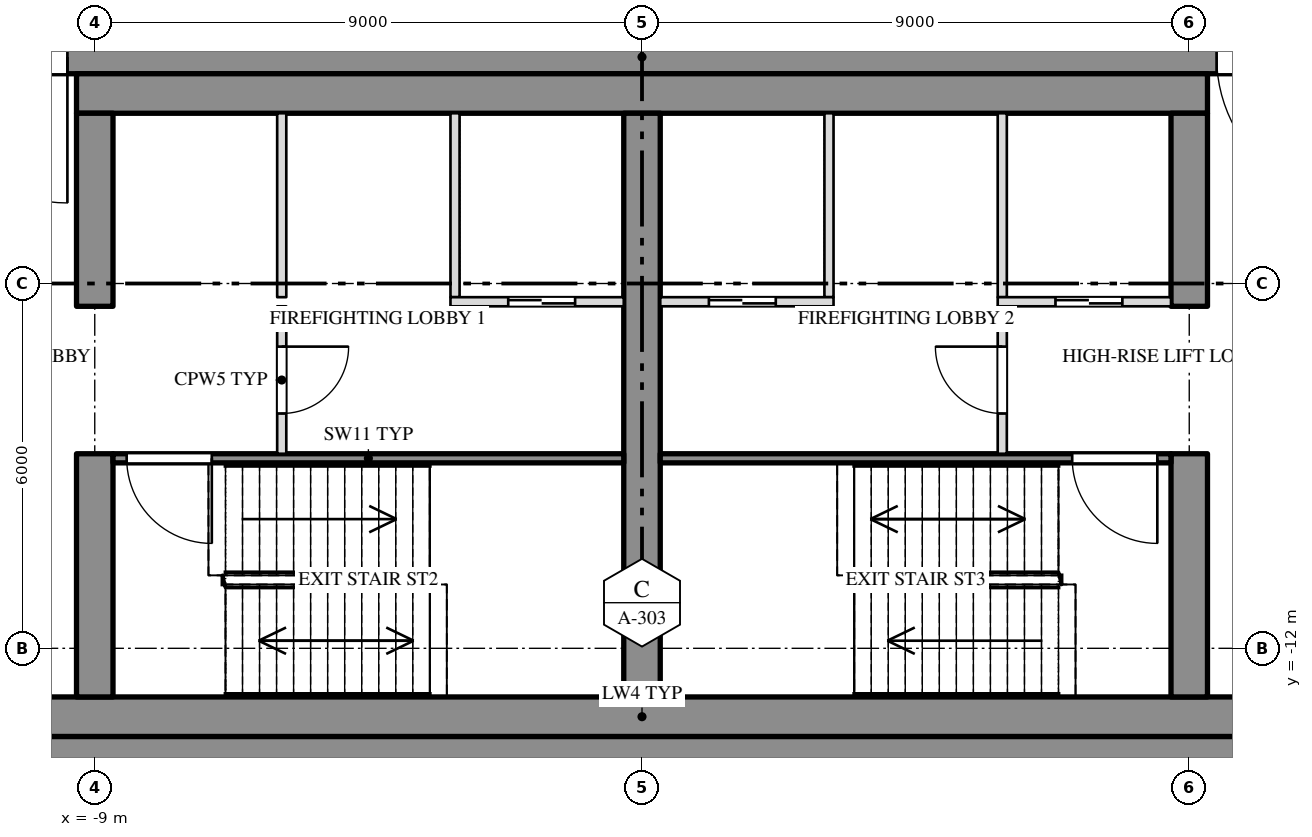
"""IFC4 building model, lengths in metres.
Left out: names, types, materials, properties, quantities, classifications, styles, units other than length and angle.
Written with IfcOpenShell. Run it as: python <this file> out.ifc"""

import sys

from ifc_helpers import new_model, si_unit, direction, frame, frame_2d, origin, place, context, subcontext, project, spatial, rectangle, extrude, element, fill, save


model = new_model("IFC4")
c1 = context("Model", 3, precision=1e-05, world=origin(), true_north=direction((0.0, 1.0)))
c2 = subcontext(c1, "Body", "Model", "MODEL_VIEW")
j1 = project(units=[si_unit("LENGTHUNIT", "METRE"), si_unit("PLANEANGLEUNIT", "RADIAN")], contexts=[c1])
p1 = place(None, origin())
s1 = spatial("IfcSite", under=j1, at=p1, CompositionType="ELEMENT")
p2 = place(p1, origin())
s2 = spatial("IfcBuilding", under=s1, at=p2, CompositionType="ELEMENT")
p3 = place(p2, frame((0.0, 0.0, 280.5)))
s3 = spatial("IfcBuildingStorey", under=s2, at=p3, CompositionType="ELEMENT", Elevation=280.5)
p4 = place(p3, frame((-27.0, -2.275, 0.0), z_axis=(0.0, 0.0, 1.0), x_axis=(1.0, 0.0, 0.0)))
e1 = element("IfcWall", 1, at=p4, inside=s3, PredefinedType="SHEAR", context=c2, shape_type="SweptSolid", body=[
    extrude(rectangle(XDim=54.0, YDim=0.55, at=frame_2d((27.0, 0.0))), origin(), (0.0, 0.0, 1.0), 3.78),
])
p5 = place(p4, frame((15.15, 0.0, 0.0)))
e2 = element("IfcOpeningElement", 2, at=p5, cuts=e1, PredefinedType="OPENING", context=c2, shape_type="SweptSolid", body=[
    extrude(rectangle(XDim=2.4, YDim=2.1, at=frame_2d((1.2, 1.05))), frame((0.0, 0.287, 0.0), z_axis=(0.0, -1.0, 0.0), x_axis=(1.0, 0.0, 0.0)), (0.0, 0.0, 1.0), 0.574),
])
p6 = place(p4, frame((36.45, 0.0, 0.0)))
e3 = element("IfcOpeningElement", 3, at=p6, cuts=e1, PredefinedType="OPENING", context=c2, shape_type="SweptSolid", body=[
    extrude(rectangle(XDim=2.4, YDim=2.1, at=frame_2d((1.2, 1.05))), frame((0.0, 0.287, 0.0), z_axis=(0.0, -1.0, 0.0), x_axis=(1.0, 0.0, 0.0)), (0.0, 0.0, 1.0), 0.574),
])
p7 = place(p3, frame((-27.0, -13.725, 0.0), z_axis=(0.0, 0.0, 1.0), x_axis=(1.0, 0.0, 0.0)))
e4 = element("IfcWall", 4, at=p7, inside=s3, PredefinedType="SHEAR", context=c2, shape_type="SweptSolid", body=[
    extrude(rectangle(XDim=54.0, YDim=0.55, at=frame_2d((27.0, 0.0))), origin(), (0.0, 0.0, 1.0), 3.78),
])
p8 = place(p3, frame((-9.3, -2.875, 0.0), z_axis=(0.0, 0.0, 1.0), x_axis=(1.0, 0.0, 0.0)))
e5 = element("IfcWall", 5, at=p8, inside=s3, PredefinedType="SHEAR", context=c2, shape_type="SweptSolid", body=[
    extrude(rectangle(XDim=18.6, YDim=0.65, at=frame_2d((9.3, 0.0))), origin(), (0.0, 0.0, 1.0), 3.78),
])
p9 = place(p3, frame((-26.45, -13.125, 0.0), z_axis=(0.0, 0.0, 1.0), x_axis=(1.0, 0.0, 0.0)))
e6 = element("IfcWall", 6, at=p9, inside=s3, PredefinedType="SHEAR", context=c2, shape_type="SweptSolid", body=[
    extrude(rectangle(XDim=52.9, YDim=0.65, at=frame_2d((26.45, 0.0))), origin(), (0.0, 0.0, 1.0), 3.78),
])
p10 = place(p3, frame((-9.0, -12.8, 0.0), z_axis=(0.0, 0.0, 1.0), x_axis=(0.0, 1.0, 0.0)))
e7 = element("IfcWall", 7, at=p10, inside=s3, PredefinedType="SHEAR", context=c2, shape_type="SweptSolid", body=[
    extrude(rectangle(XDim=4.0, YDim=0.6, at=frame_2d((2.0, 0.0))), origin(), (0.0, 0.0, 1.0), 3.78),
])
p11 = place(p3, frame((-9.0, -6.375, 0.0), z_axis=(0.0, 0.0, 1.0), x_axis=(0.0, 1.0, 0.0)))
e8 = element("IfcWall", 8, at=p11, inside=s3, PredefinedType="SHEAR", context=c2, shape_type="SweptSolid", body=[
    extrude(rectangle(XDim=3.175, YDim=0.6, at=frame_2d((1.587, 0.0))), origin(), (0.0, 0.0, 1.0), 3.78),
])
p12 = place(p3, frame((0.0, -12.8, 0.0), z_axis=(0.0, 0.0, 1.0), x_axis=(0.0, 1.0, 0.0)))
e9 = element("IfcWall", 9, at=p12, inside=s3, PredefinedType="SHEAR", context=c2, shape_type="SweptSolid", body=[
    extrude(rectangle(XDim=9.6, YDim=0.6, at=frame_2d((4.8, 0.0))), origin(), (0.0, 0.0, 1.0), 3.78),
])
p13 = place(p3, frame((9.0, -12.8, 0.0), z_axis=(0.0, 0.0, 1.0), x_axis=(0.0, 1.0, 0.0)))
e10 = element("IfcWall", 10, at=p13, inside=s3, PredefinedType="SHEAR", context=c2, shape_type="SweptSolid", body=[
    extrude(rectangle(XDim=4.0, YDim=0.6, at=frame_2d((2.0, 0.0))), origin(), (0.0, 0.0, 1.0), 3.78),
])
p14 = place(p3, frame((9.0, -6.375, 0.0), z_axis=(0.0, 0.0, 1.0), x_axis=(0.0, 1.0, 0.0)))
e11 = element("IfcWall", 11, at=p14, inside=s3, PredefinedType="SHEAR", context=c2, shape_type="SweptSolid", body=[
    extrude(rectangle(XDim=3.175, YDim=0.6, at=frame_2d((1.587, 0.0))), origin(), (0.0, 0.0, 1.0), 3.78),
])
for number, where, z_axis, x_axis in (
    (12, (-3.075, -6.225, 0.0), (0.0, 0.0, 1.0), (0.0, 1.0, 0.0)),
    (13, (-5.925, -6.225, 0.0), (0.0, 0.0, 1.0), (0.0, 1.0, 0.0)),
    (14, (3.075, -6.225, 0.0), (0.0, 0.0, 1.0), (0.0, 1.0, 0.0)),
    (15, (5.925, -6.225, 0.0), (0.0, 0.0, 1.0), (0.0, 1.0, 0.0)),
):
    element("IfcWall", number, at=place(p3, frame(where, z_axis=z_axis, x_axis=x_axis)), inside=s3, PredefinedType="PARTITIONING", context=c2, shape_type="SweptSolid", body=[
        extrude(rectangle(XDim=3.025, YDim=0.15, at=frame_2d((1.513, 0.0))), origin(), (0.0, 0.0, 1.0), 3.78),
    ])
p15 = place(p3, frame((-5.925, -8.8, 0.0), z_axis=(0.0, 0.0, 1.0), x_axis=(0.0, 1.0, 0.0)))
e16 = element("IfcWall", 16, at=p15, inside=s3, PredefinedType="PARTITIONING", context=c2, shape_type="SweptSolid", body=[
    extrude(rectangle(XDim=2.425, YDim=0.15, at=frame_2d((1.212, 0.0))), origin(), (0.0, 0.0, 1.0), 3.78),
])
p16 = place(p15, frame((0.662, 0.0, 0.0)))
e17 = element("IfcOpeningElement", 17, at=p16, cuts=e16, PredefinedType="OPENING", context=c2, shape_type="SweptSolid", body=[
    extrude(rectangle(XDim=1.1, YDim=2.1, at=frame_2d((0.55, 1.05))), frame((0.0, 0.087, 0.0), z_axis=(0.0, -1.0, 0.0), x_axis=(1.0, 0.0, 0.0)), (0.0, 0.0, 1.0), 0.174),
])
p17 = place(p3, frame((5.925, -8.8, 0.0), z_axis=(0.0, 0.0, 1.0), x_axis=(0.0, 1.0, 0.0)))
e18 = element("IfcWall", 18, at=p17, inside=s3, PredefinedType="PARTITIONING", context=c2, shape_type="SweptSolid", body=[
    extrude(rectangle(XDim=2.425, YDim=0.15, at=frame_2d((1.212, 0.0))), origin(), (0.0, 0.0, 1.0), 3.78),
])
p18 = place(p17, frame((0.662, 0.0, 0.0)))
e19 = element("IfcOpeningElement", 19, at=p18, cuts=e18, PredefinedType="OPENING", context=c2, shape_type="SweptSolid", body=[
    extrude(rectangle(XDim=1.1, YDim=2.1, at=frame_2d((0.55, 1.05))), frame((0.0, 0.087, 0.0), z_axis=(0.0, -1.0, 0.0), x_axis=(1.0, 0.0, 0.0)), (0.0, 0.0, 1.0), 0.174),
])
p19 = place(p3, frame((-3.15, -6.3, 0.0), z_axis=(0.0, 0.0, 1.0), x_axis=(1.0, 0.0, 0.0)))
e20 = element("IfcWall", 20, at=p19, inside=s3, PredefinedType="PARTITIONING", context=c2, shape_type="SweptSolid", body=[
    extrude(rectangle(XDim=2.85, YDim=0.15, at=frame_2d((1.425, 0.0))), origin(), (0.0, 0.0, 1.0), 3.78),
])
p20 = place(p19, frame((0.95, 0.0, 0.0)))
e21 = element("IfcOpeningElement", 21, at=p20, cuts=e20, PredefinedType="OPENING", context=c2, shape_type="SweptSolid", body=[
    extrude(rectangle(XDim=1.1, YDim=2.1, at=frame_2d((0.55, 1.05))), frame((0.0, 0.087, 0.0), z_axis=(0.0, -1.0, 0.0), x_axis=(1.0, 0.0, 0.0)), (0.0, 0.0, 1.0), 0.174),
])
p21 = place(p3, frame((0.3, -6.3, 0.0), z_axis=(0.0, 0.0, 1.0), x_axis=(1.0, 0.0, 0.0)))
e22 = element("IfcWall", 22, at=p21, inside=s3, PredefinedType="PARTITIONING", context=c2, shape_type="SweptSolid", body=[
    extrude(rectangle(XDim=2.85, YDim=0.15, at=frame_2d((1.425, 0.0))), origin(), (0.0, 0.0, 1.0), 3.78),
])
p22 = place(p21, frame((0.8, 0.0, 0.0)))
e23 = element("IfcOpeningElement", 23, at=p22, cuts=e22, PredefinedType="OPENING", context=c2, shape_type="SweptSolid", body=[
    extrude(rectangle(XDim=1.1, YDim=2.1, at=frame_2d((0.55, 1.05))), frame((0.0, 0.087, 0.0), z_axis=(0.0, -1.0, 0.0), x_axis=(1.0, 0.0, 0.0)), (0.0, 0.0, 1.0), 0.174),
])
p23 = place(p3, frame((5.85, -6.3, 0.0), z_axis=(0.0, 0.0, 1.0), x_axis=(1.0, 0.0, 0.0)))
e24 = element("IfcWall", 24, at=p23, inside=s3, PredefinedType="PARTITIONING", context=c2, shape_type="SweptSolid", body=[
    extrude(rectangle(XDim=2.85, YDim=0.15, at=frame_2d((1.425, 0.0))), origin(), (0.0, 0.0, 1.0), 3.78),
])
p24 = place(p23, frame((0.95, 0.0, 0.0)))
e25 = element("IfcOpeningElement", 25, at=p24, cuts=e24, PredefinedType="OPENING", context=c2, shape_type="SweptSolid", body=[
    extrude(rectangle(XDim=1.1, YDim=2.1, at=frame_2d((0.55, 1.05))), frame((0.0, 0.087, 0.0), z_axis=(0.0, -1.0, 0.0), x_axis=(1.0, 0.0, 0.0)), (0.0, 0.0, 1.0), 0.174),
])
p25 = place(p3, frame((-8.7, -8.875, 0.0), z_axis=(0.0, 0.0, 1.0), x_axis=(1.0, 0.0, 0.0)))
e26 = element("IfcWall", 26, at=p25, inside=s3, PredefinedType="SHEAR", context=c2, shape_type="SweptSolid", body=[
    extrude(rectangle(XDim=8.4, YDim=0.15, at=frame_2d((4.2, 0.0))), origin(), (0.0, 0.0, 1.0), 3.78),
])
p26 = place(p25, frame((0.225, 0.0, 0.0)))
e27 = element("IfcOpeningElement", 27, at=p26, cuts=e26, PredefinedType="OPENING", context=c2, shape_type="SweptSolid", body=[
    extrude(rectangle(XDim=1.4, YDim=2.1, at=frame_2d((0.7, 1.05))), frame((0.0, 0.087, 0.0), z_axis=(0.0, -1.0, 0.0), x_axis=(1.0, 0.0, 0.0)), (0.0, 0.0, 1.0), 0.174),
])
p27 = place(p3, frame((0.3, -8.875, 0.0), z_axis=(0.0, 0.0, 1.0), x_axis=(1.0, 0.0, 0.0)))
e28 = element("IfcWall", 28, at=p27, inside=s3, PredefinedType="SHEAR", context=c2, shape_type="SweptSolid", body=[
    extrude(rectangle(XDim=8.4, YDim=0.15, at=frame_2d((4.2, 0.0))), origin(), (0.0, 0.0, 1.0), 3.78),
])
p28 = place(p27, frame((6.775, 0.0, 0.0)))
e29 = element("IfcOpeningElement", 29, at=p28, cuts=e28, PredefinedType="OPENING", context=c2, shape_type="SweptSolid", body=[
    extrude(rectangle(XDim=1.4, YDim=2.1, at=frame_2d((0.7, 1.05))), frame((0.0, 0.087, 0.0), z_axis=(0.0, -1.0, 0.0), x_axis=(1.0, 0.0, 0.0)), (0.0, 0.0, 1.0), 0.174),
])
p29 = place(p5, origin())
e30 = element("IfcDoor", 30, at=p29, inside=s3, OperationType="DOUBLE_DOOR_SINGLE_SWING", PredefinedType="DOOR", context=c2, shape_type="SweptSolid", body=[
    extrude(rectangle(XDim=2.4, YDim=2.1, at=frame_2d((1.2, 1.05))), frame((0.0, 0.025, 0.0), z_axis=(0.0, -1.0, 0.0), x_axis=(1.0, 0.0, 0.0)), (0.0, 0.0, 1.0), 0.05),
])
fill(e2, e30)
p30 = place(p26, origin())
e31 = element("IfcDoor", 31, at=p30, inside=s3, OperationType="DOUBLE_DOOR_SINGLE_SWING", PredefinedType="DOOR", context=c2, shape_type="SweptSolid", body=[
    extrude(rectangle(XDim=1.4, YDim=2.1, at=frame_2d((0.7, 1.05))), frame((0.0, 0.025, 0.0), z_axis=(0.0, -1.0, 0.0), x_axis=(1.0, 0.0, 0.0)), (0.0, 0.0, 1.0), 0.05),
])
fill(e27, e31)
p31 = place(p16, origin())
e32 = element("IfcDoor", 32, at=p31, inside=s3, OperationType="SINGLE_SWING_LEFT", PredefinedType="DOOR", context=c2, shape_type="SweptSolid", body=[
    extrude(rectangle(XDim=1.1, YDim=2.1, at=frame_2d((0.55, 1.05))), frame((0.0, 0.025, 0.0), z_axis=(0.0, -1.0, 0.0), x_axis=(1.0, 0.0, 0.0)), (0.0, 0.0, 1.0), 0.05),
])
fill(e17, e32)
p32 = place(p20, origin())
e33 = element("IfcDoor", 33, at=p32, inside=s3, OperationType="SLIDING_TO_LEFT", PredefinedType="DOOR", context=c2, shape_type="SweptSolid", body=[
    extrude(rectangle(XDim=1.1, YDim=2.1, at=frame_2d((0.55, 1.05))), frame((0.0, 0.025, 0.0), z_axis=(0.0, -1.0, 0.0), x_axis=(1.0, 0.0, 0.0)), (0.0, 0.0, 1.0), 0.05),
])
fill(e21, e33)
p33 = place(p22, origin())
e34 = element("IfcDoor", 34, at=p33, inside=s3, OperationType="SLIDING_TO_RIGHT", PredefinedType="DOOR", context=c2, shape_type="SweptSolid", body=[
    extrude(rectangle(XDim=1.1, YDim=2.1, at=frame_2d((0.55, 1.05))), frame((0.0, 0.025, 0.0), z_axis=(0.0, -1.0, 0.0), x_axis=(1.0, 0.0, 0.0)), (0.0, 0.0, 1.0), 0.05),
])
fill(e23, e34)
p34 = place(p18, origin())
e35 = element("IfcDoor", 35, at=p34, inside=s3, OperationType="SINGLE_SWING_RIGHT", PredefinedType="DOOR", context=c2, shape_type="SweptSolid", body=[
    extrude(rectangle(XDim=1.1, YDim=2.1, at=frame_2d((0.55, 1.05))), frame((0.0, 0.025, 0.0), z_axis=(0.0, -1.0, 0.0), x_axis=(1.0, 0.0, 0.0)), (0.0, 0.0, 1.0), 0.05),
])
fill(e19, e35)
p35 = place(p24, origin())
e36 = element("IfcDoor", 36, at=p35, inside=s3, OperationType="SLIDING_TO_RIGHT", PredefinedType="DOOR", context=c2, shape_type="SweptSolid", body=[
    extrude(rectangle(XDim=1.1, YDim=2.1, at=frame_2d((0.55, 1.05))), frame((0.0, 0.025, 0.0), z_axis=(0.0, -1.0, 0.0), x_axis=(1.0, 0.0, 0.0)), (0.0, 0.0, 1.0), 0.05),
])
fill(e25, e36)
p36 = place(p28, origin())
e37 = element("IfcDoor", 37, at=p36, inside=s3, OperationType="DOUBLE_DOOR_SINGLE_SWING", PredefinedType="DOOR", context=c2, shape_type="SweptSolid", body=[
    extrude(rectangle(XDim=1.4, YDim=2.1, at=frame_2d((0.7, 1.05))), frame((0.0, 0.025, 0.0), z_axis=(0.0, -1.0, 0.0), x_axis=(1.0, 0.0, 0.0)), (0.0, 0.0, 1.0), 0.05),
])
fill(e29, e37)
p37 = place(p6, origin())
e38 = element("IfcDoor", 38, at=p37, inside=s3, OperationType="DOUBLE_DOOR_SINGLE_SWING", PredefinedType="DOOR", context=c2, shape_type="SweptSolid", body=[
    extrude(rectangle(XDim=2.4, YDim=2.1, at=frame_2d((1.2, 1.05))), frame((0.0, 0.025, 0.0), z_axis=(0.0, -1.0, 0.0), x_axis=(1.0, 0.0, 0.0)), (0.0, 0.0, 1.0), 0.05),
])
fill(e3, e38)
save(model, sys.argv[1])
